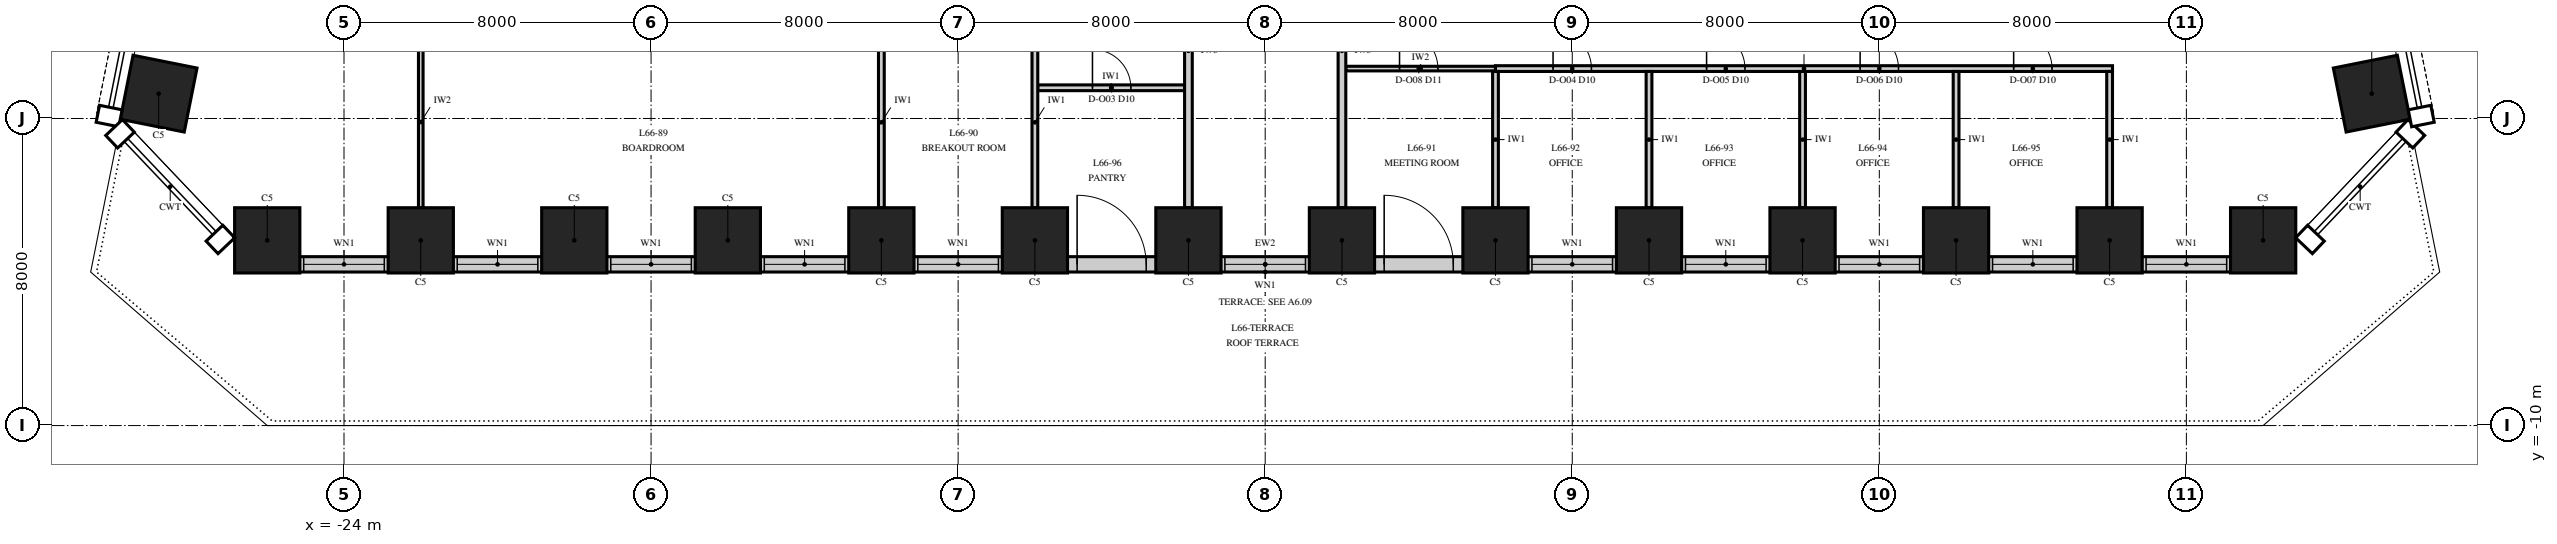
"""IFC4 building model, lengths in metres.
Left out: names, types, materials, properties, quantities, classifications, styles, units other than length and angle.
Written with IfcOpenShell. Run it as: python <this file> out.ifc"""

import sys

from ifc_helpers import new_model, si_unit, direction, frame, frame_2d, origin, origin_2d, place, context, subcontext, project, spatial, rectangle, extrude, element, fill, save


model = new_model("IFC4")
c1 = context("Model", 3, precision=1e-05, world=origin(), true_north=direction((0.0, 1.0)))
c2 = subcontext(c1, "Body", "Model", "MODEL_VIEW")
j1 = project(units=[si_unit("LENGTHUNIT", "METRE"), si_unit("PLANEANGLEUNIT", "RADIAN")], contexts=[c1])
p1 = place(None, origin())
s1 = spatial("IfcSite", under=j1, at=p1, CompositionType="ELEMENT")
p2 = place(p1, origin())
s2 = spatial("IfcBuilding", under=s1, at=p2, CompositionType="ELEMENT")
p3 = place(p2, frame((0.0, 0.0, 284.0)))
s3 = spatial("IfcBuildingStorey", under=s2, at=p3, CompositionType="ELEMENT", Elevation=284.0)
for number, where, z_axis, x_axis in (
    (1, (-26.0, -5.175, 0.0), (0.0, 0.0, 1.0), (1.0, 0.0, 0.0)),
    (2, (-22.0, -5.175, 0.0), (0.0, 0.0, 1.0), (1.0, 0.0, 0.0)),
    (3, (-18.0, -5.175, 0.0), (0.0, 0.0, 1.0), (1.0, 0.0, 0.0)),
    (4, (-14.0, -5.175, 0.0), (0.0, 0.0, 1.0), (1.0, 0.0, 0.0)),
    (5, (-10.0, -5.175, 0.0), (0.0, 0.0, 1.0), (1.0, 0.0, 0.0)),
    (6, (-6.0, -5.175, 0.0), (0.0, 0.0, 1.0), (1.0, 0.0, 0.0)),
    (7, (-2.0, -5.175, 0.0), (0.0, 0.0, 1.0), (1.0, 0.0, 0.0)),
    (8, (2.0, -5.175, 0.0), (0.0, 0.0, 1.0), (1.0, 0.0, 0.0)),
    (9, (6.0, -5.175, 0.0), (0.0, 0.0, 1.0), (1.0, 0.0, 0.0)),
    (10, (10.0, -5.175, 0.0), (0.0, 0.0, 1.0), (1.0, 0.0, 0.0)),
    (11, (14.0, -5.175, 0.0), (0.0, 0.0, 1.0), (1.0, 0.0, 0.0)),
    (12, (18.0, -5.175, 0.0), (0.0, 0.0, 1.0), (1.0, 0.0, 0.0)),
    (13, (22.0, -5.175, 0.0), (0.0, 0.0, 1.0), (1.0, 0.0, 0.0)),
    (14, (26.0, -5.175, 0.0), (0.0, 0.0, 1.0), (1.0, 0.0, 0.0)),
    (15, (28.829, -1.353, 0.0), (0.0, 0.0, 1.0), (-0.196, 0.981, 0.0)),
    (16, (-28.829, -1.353, 0.0), (0.0, 0.0, 1.0), (-0.196, -0.981, 0.0)),
):
    element("IfcColumn", number, at=place(p3, frame(where, z_axis=z_axis, x_axis=x_axis)), inside=s3, PredefinedType="COLUMN", context=c2, shape_type="SweptSolid", body=[
        extrude(rectangle(XDim=1.7, YDim=1.7, at=origin_2d()), origin(), (0.0, 0.0, 1.0), 4.0),
    ])
p4 = place(p3, frame((-26.0, -5.8, 0.0), z_axis=(0.0, 0.0, 1.0), x_axis=(1.0, 0.0, 0.0)))
e17 = element("IfcWall", 17, at=p4, inside=s3, PredefinedType="SOLIDWALL", context=c2, shape_type="SweptSolid", body=[
    extrude(rectangle(XDim=52.0, YDim=0.4, at=frame_2d((26.0, 0.0))), origin(), (0.0, 0.0, 1.0), 2.0),
])
p5 = place(p4, frame((0.95, 0.0, 0.8)))
e18 = element("IfcOpeningElement", 18, at=p5, cuts=e17, PredefinedType="OPENING", context=c2, shape_type="SweptSolid", body=[
    extrude(rectangle(XDim=2.1, YDim=1.15, at=frame_2d((1.05, 0.575))), frame((0.0, 0.215, 0.0), z_axis=(0.0, -1.0, 0.0), x_axis=(1.0, 0.0, 0.0)), (0.0, 0.0, 1.0), 0.43),
])
p6 = place(p4, frame((4.95, 0.0, 0.8)))
e19 = element("IfcOpeningElement", 19, at=p6, cuts=e17, PredefinedType="OPENING", context=c2, shape_type="SweptSolid", body=[
    extrude(rectangle(XDim=2.1, YDim=1.15, at=frame_2d((1.05, 0.575))), frame((0.0, 0.215, 0.0), z_axis=(0.0, -1.0, 0.0), x_axis=(1.0, 0.0, 0.0)), (0.0, 0.0, 1.0), 0.43),
])
p7 = place(p4, frame((8.95, 0.0, 0.8)))
e20 = element("IfcOpeningElement", 20, at=p7, cuts=e17, PredefinedType="OPENING", context=c2, shape_type="SweptSolid", body=[
    extrude(rectangle(XDim=2.1, YDim=1.15, at=frame_2d((1.05, 0.575))), frame((0.0, 0.215, 0.0), z_axis=(0.0, -1.0, 0.0), x_axis=(1.0, 0.0, 0.0)), (0.0, 0.0, 1.0), 0.43),
])
p8 = place(p4, frame((12.95, 0.0, 0.8)))
e21 = element("IfcOpeningElement", 21, at=p8, cuts=e17, PredefinedType="OPENING", context=c2, shape_type="SweptSolid", body=[
    extrude(rectangle(XDim=2.1, YDim=1.15, at=frame_2d((1.05, 0.575))), frame((0.0, 0.215, 0.0), z_axis=(0.0, -1.0, 0.0), x_axis=(1.0, 0.0, 0.0)), (0.0, 0.0, 1.0), 0.43),
])
p9 = place(p4, frame((16.95, 0.0, 0.8)))
e22 = element("IfcOpeningElement", 22, at=p9, cuts=e17, PredefinedType="OPENING", context=c2, shape_type="SweptSolid", body=[
    extrude(rectangle(XDim=2.1, YDim=1.15, at=frame_2d((1.05, 0.575))), frame((0.0, 0.215, 0.0), z_axis=(0.0, -1.0, 0.0), x_axis=(1.0, 0.0, 0.0)), (0.0, 0.0, 1.0), 0.43),
])
p10 = place(p4, frame((21.1, 0.0, 0.0)))
e23 = element("IfcOpeningElement", 23, at=p10, cuts=e17, PredefinedType="OPENING", context=c2, shape_type="SweptSolid", body=[
    extrude(rectangle(XDim=1.8, YDim=2.0, at=frame_2d((0.9, 1.0))), frame((0.0, 0.215, 0.0), z_axis=(0.0, -1.0, 0.0), x_axis=(1.0, 0.0, 0.0)), (0.0, 0.0, 1.0), 0.43),
])
p11 = place(p4, frame((24.95, 0.0, 0.8)))
e24 = element("IfcOpeningElement", 24, at=p11, cuts=e17, PredefinedType="OPENING", context=c2, shape_type="SweptSolid", body=[
    extrude(rectangle(XDim=2.1, YDim=1.15, at=frame_2d((1.05, 0.575))), frame((0.0, 0.215, 0.0), z_axis=(0.0, -1.0, 0.0), x_axis=(1.0, 0.0, 0.0)), (0.0, 0.0, 1.0), 0.43),
])
p12 = place(p4, frame((29.1, 0.0, 0.0)))
e25 = element("IfcOpeningElement", 25, at=p12, cuts=e17, PredefinedType="OPENING", context=c2, shape_type="SweptSolid", body=[
    extrude(rectangle(XDim=1.8, YDim=2.0, at=frame_2d((0.9, 1.0))), frame((0.0, 0.215, 0.0), z_axis=(0.0, -1.0, 0.0), x_axis=(1.0, 0.0, 0.0)), (0.0, 0.0, 1.0), 0.43),
])
p13 = place(p4, frame((32.95, 0.0, 0.8)))
e26 = element("IfcOpeningElement", 26, at=p13, cuts=e17, PredefinedType="OPENING", context=c2, shape_type="SweptSolid", body=[
    extrude(rectangle(XDim=2.1, YDim=1.15, at=frame_2d((1.05, 0.575))), frame((0.0, 0.215, 0.0), z_axis=(0.0, -1.0, 0.0), x_axis=(1.0, 0.0, 0.0)), (0.0, 0.0, 1.0), 0.43),
])
p14 = place(p4, frame((36.95, 0.0, 0.8)))
e27 = element("IfcOpeningElement", 27, at=p14, cuts=e17, PredefinedType="OPENING", context=c2, shape_type="SweptSolid", body=[
    extrude(rectangle(XDim=2.1, YDim=1.15, at=frame_2d((1.05, 0.575))), frame((0.0, 0.215, 0.0), z_axis=(0.0, -1.0, 0.0), x_axis=(1.0, 0.0, 0.0)), (0.0, 0.0, 1.0), 0.43),
])
p15 = place(p4, frame((40.95, 0.0, 0.8)))
e28 = element("IfcOpeningElement", 28, at=p15, cuts=e17, PredefinedType="OPENING", context=c2, shape_type="SweptSolid", body=[
    extrude(rectangle(XDim=2.1, YDim=1.15, at=frame_2d((1.05, 0.575))), frame((0.0, 0.215, 0.0), z_axis=(0.0, -1.0, 0.0), x_axis=(1.0, 0.0, 0.0)), (0.0, 0.0, 1.0), 0.43),
])
p16 = place(p4, frame((44.95, 0.0, 0.8)))
e29 = element("IfcOpeningElement", 29, at=p16, cuts=e17, PredefinedType="OPENING", context=c2, shape_type="SweptSolid", body=[
    extrude(rectangle(XDim=2.1, YDim=1.15, at=frame_2d((1.05, 0.575))), frame((0.0, 0.215, 0.0), z_axis=(0.0, -1.0, 0.0), x_axis=(1.0, 0.0, 0.0)), (0.0, 0.0, 1.0), 0.43),
])
p17 = place(p4, frame((48.95, 0.0, 0.8)))
e30 = element("IfcOpeningElement", 30, at=p17, cuts=e17, PredefinedType="OPENING", context=c2, shape_type="SweptSolid", body=[
    extrude(rectangle(XDim=2.1, YDim=1.15, at=frame_2d((1.05, 0.575))), frame((0.0, 0.215, 0.0), z_axis=(0.0, -1.0, 0.0), x_axis=(1.0, 0.0, 0.0)), (0.0, 0.0, 1.0), 0.43),
])
p18 = place(p3, frame((-5.925, -1.2, 0.0), z_axis=(0.0, 0.0, 1.0), x_axis=(1.0, 0.0, 0.0)))
e31 = element("IfcWall", 31, at=p18, inside=s3, PredefinedType="PARTITIONING", context=c2, shape_type="SweptSolid", body=[
    extrude(rectangle(XDim=3.825, YDim=0.15, at=frame_2d((1.913, 0.0))), origin(), (0.0, 0.0, 1.0), 3.23),
])
p19 = place(p18, frame((1.425, 0.0, 0.0)))
e32 = element("IfcOpeningElement", 32, at=p19, cuts=e31, PredefinedType="OPENING", context=c2, shape_type="SweptSolid", body=[
    extrude(rectangle(XDim=1.0, YDim=2.3, at=frame_2d((0.5, 1.15))), frame((0.0, 0.09, 0.0), z_axis=(0.0, -1.0, 0.0), x_axis=(1.0, 0.0, 0.0)), (0.0, 0.0, 1.0), 0.18),
])
p20 = place(p3, frame((2.1, -0.7, 0.0), z_axis=(0.0, 0.0, 1.0), x_axis=(1.0, 0.0, 0.0)))
e33 = element("IfcWall", 33, at=p20, inside=s3, PredefinedType="PARTITIONING", context=c2, shape_type="SweptSolid", body=[
    extrude(rectangle(XDim=3.9, YDim=0.12, at=frame_2d((1.95, 0.0))), origin(), (0.0, 0.0, 1.0), 3.23),
])
p21 = place(p20, frame((1.4, 0.0, 0.0)))
e34 = element("IfcOpeningElement", 34, at=p21, cuts=e33, PredefinedType="OPENING", context=c2, shape_type="SweptSolid", body=[
    extrude(rectangle(XDim=1.0, YDim=2.4, at=frame_2d((0.5, 1.2))), frame((0.0, 0.075, 0.0), z_axis=(0.0, -1.0, 0.0), x_axis=(1.0, 0.0, 0.0)), (0.0, 0.0, 1.0), 0.15),
])
p22 = place(p3, frame((6.0, -0.7, 0.0), z_axis=(0.0, 0.0, 1.0), x_axis=(1.0, 0.0, 0.0)))
e35 = element("IfcWall", 35, at=p22, inside=s3, PredefinedType="PARTITIONING", context=c2, shape_type="SweptSolid", body=[
    extrude(rectangle(XDim=16.075, YDim=0.15, at=frame_2d((8.038, 0.0))), origin(), (0.0, 0.0, 1.0), 3.23),
])
p23 = place(p22, frame((1.5, 0.0, 0.0)))
e36 = element("IfcOpeningElement", 36, at=p23, cuts=e35, PredefinedType="OPENING", context=c2, shape_type="SweptSolid", body=[
    extrude(rectangle(XDim=1.0, YDim=2.3, at=frame_2d((0.5, 1.15))), frame((0.0, 0.09, 0.0), z_axis=(0.0, -1.0, 0.0), x_axis=(1.0, 0.0, 0.0)), (0.0, 0.0, 1.0), 0.18),
])
p24 = place(p22, frame((5.5, 0.0, 0.0)))
e37 = element("IfcOpeningElement", 37, at=p24, cuts=e35, PredefinedType="OPENING", context=c2, shape_type="SweptSolid", body=[
    extrude(rectangle(XDim=1.0, YDim=2.3, at=frame_2d((0.5, 1.15))), frame((0.0, 0.09, 0.0), z_axis=(0.0, -1.0, 0.0), x_axis=(1.0, 0.0, 0.0)), (0.0, 0.0, 1.0), 0.18),
])
p25 = place(p22, frame((9.5, 0.0, 0.0)))
e38 = element("IfcOpeningElement", 38, at=p25, cuts=e35, PredefinedType="OPENING", context=c2, shape_type="SweptSolid", body=[
    extrude(rectangle(XDim=1.0, YDim=2.3, at=frame_2d((0.5, 1.15))), frame((0.0, 0.09, 0.0), z_axis=(0.0, -1.0, 0.0), x_axis=(1.0, 0.0, 0.0)), (0.0, 0.0, 1.0), 0.18),
])
p26 = place(p22, frame((13.5, 0.0, 0.0)))
e39 = element("IfcOpeningElement", 39, at=p26, cuts=e35, PredefinedType="OPENING", context=c2, shape_type="SweptSolid", body=[
    extrude(rectangle(XDim=1.0, YDim=2.3, at=frame_2d((0.5, 1.15))), frame((0.0, 0.09, 0.0), z_axis=(0.0, -1.0, 0.0), x_axis=(1.0, 0.0, 0.0)), (0.0, 0.0, 1.0), 0.18),
])
p27 = place(p3, frame((-22.0, -4.325, 0.0), z_axis=(0.0, 0.0, 1.0), x_axis=(0.0, 1.0, 0.0)))
e40 = element("IfcWall", 40, at=p27, inside=s3, PredefinedType="PARTITIONING", context=c2, shape_type="SweptSolid", body=[
    extrude(rectangle(XDim=4.465, YDim=0.12, at=frame_2d((2.232, 0.0))), origin(), (0.0, 0.0, 1.0), 3.23),
])
for number, where, z_axis, x_axis in (
    (41, (-10.0, -4.325, 0.0), (0.0, 0.0, 1.0), (0.0, 1.0, 0.0)),
    (42, (-6.0, -4.325, 0.0), (0.0, 0.0, 1.0), (0.0, 1.0, 0.0)),
):
    element("IfcWall", number, at=place(p3, frame(where, z_axis=z_axis, x_axis=x_axis)), inside=s3, PredefinedType="PARTITIONING", context=c2, shape_type="SweptSolid", body=[
        extrude(rectangle(XDim=4.45, YDim=0.15, at=frame_2d((2.225, 0.0))), origin(), (0.0, 0.0, 1.0), 3.23),
    ])
for number, where, z_axis, x_axis in (
    (43, (-2.0, -4.325, 0.0), (0.0, 0.0, 1.0), (0.0, 1.0, 0.0)),
    (44, (2.0, -4.325, 0.0), (0.0, 0.0, 1.0), (0.0, 1.0, 0.0)),
):
    element("IfcWall", number, at=place(p3, frame(where, z_axis=z_axis, x_axis=x_axis)), inside=s3, PredefinedType="PARTITIONING", context=c2, shape_type="SweptSolid", body=[
        extrude(rectangle(XDim=8.175, YDim=0.2, at=frame_2d((4.087, 0.0))), origin(), (0.0, 0.0, 1.0), 3.23),
    ])
for number, where, z_axis, x_axis in (
    (45, (6.0, -4.325, 0.0), (0.0, 0.0, 1.0), (0.0, 1.0, 0.0)),
    (46, (10.0, -4.325, 0.0), (0.0, 0.0, 1.0), (0.0, 1.0, 0.0)),
    (47, (14.0, -4.325, 0.0), (0.0, 0.0, 1.0), (0.0, 1.0, 0.0)),
    (48, (18.0, -4.325, 0.0), (0.0, 0.0, 1.0), (0.0, 1.0, 0.0)),
    (49, (22.0, -4.325, 0.0), (0.0, 0.0, 1.0), (0.0, 1.0, 0.0)),
):
    element("IfcWall", number, at=place(p3, frame(where, z_axis=z_axis, x_axis=x_axis)), inside=s3, PredefinedType="PARTITIONING", context=c2, shape_type="SweptSolid", body=[
        extrude(rectangle(XDim=3.55, YDim=0.15, at=frame_2d((1.775, 0.0))), origin(), (0.0, 0.0, 1.0), 3.23),
    ])
p28 = place(p5, origin())
e50 = element("IfcWindow", 50, at=p28, inside=s3, PartitioningType="SINGLE_PANEL", PredefinedType="WINDOW", context=c2, shape_type="SweptSolid", body=[
    extrude(rectangle(XDim=2.1, YDim=1.15, at=frame_2d((1.05, 0.575))), frame((0.0, 0.03, 0.0), z_axis=(0.0, -1.0, 0.0), x_axis=(1.0, 0.0, 0.0)), (0.0, 0.0, 1.0), 0.06),
])
fill(e18, e50)
p29 = place(p6, origin())
e51 = element("IfcWindow", 51, at=p29, inside=s3, PartitioningType="SINGLE_PANEL", PredefinedType="WINDOW", context=c2, shape_type="SweptSolid", body=[
    extrude(rectangle(XDim=2.1, YDim=1.15, at=frame_2d((1.05, 0.575))), frame((0.0, 0.03, 0.0), z_axis=(0.0, -1.0, 0.0), x_axis=(1.0, 0.0, 0.0)), (0.0, 0.0, 1.0), 0.06),
])
fill(e19, e51)
p30 = place(p7, origin())
e52 = element("IfcWindow", 52, at=p30, inside=s3, PartitioningType="SINGLE_PANEL", PredefinedType="WINDOW", context=c2, shape_type="SweptSolid", body=[
    extrude(rectangle(XDim=2.1, YDim=1.15, at=frame_2d((1.05, 0.575))), frame((0.0, 0.03, 0.0), z_axis=(0.0, -1.0, 0.0), x_axis=(1.0, 0.0, 0.0)), (0.0, 0.0, 1.0), 0.06),
])
fill(e20, e52)
p31 = place(p8, origin())
e53 = element("IfcWindow", 53, at=p31, inside=s3, PartitioningType="SINGLE_PANEL", PredefinedType="WINDOW", context=c2, shape_type="SweptSolid", body=[
    extrude(rectangle(XDim=2.1, YDim=1.15, at=frame_2d((1.05, 0.575))), frame((0.0, 0.03, 0.0), z_axis=(0.0, -1.0, 0.0), x_axis=(1.0, 0.0, 0.0)), (0.0, 0.0, 1.0), 0.06),
])
fill(e21, e53)
p32 = place(p9, origin())
e54 = element("IfcWindow", 54, at=p32, inside=s3, PartitioningType="SINGLE_PANEL", PredefinedType="WINDOW", context=c2, shape_type="SweptSolid", body=[
    extrude(rectangle(XDim=2.1, YDim=1.15, at=frame_2d((1.05, 0.575))), frame((0.0, 0.03, 0.0), z_axis=(0.0, -1.0, 0.0), x_axis=(1.0, 0.0, 0.0)), (0.0, 0.0, 1.0), 0.06),
])
fill(e22, e54)
p33 = place(p10, origin())
e55 = element("IfcDoor", 55, at=p33, inside=s3, OperationType="DOUBLE_DOOR_SINGLE_SWING", PredefinedType="DOOR", context=c2, shape_type="SweptSolid", body=[
    extrude(rectangle(XDim=1.8, YDim=2.0, at=frame_2d((0.9, 1.0))), frame((0.0, 0.2, 0.0), z_axis=(0.0, -1.0, 0.0), x_axis=(1.0, 0.0, 0.0)), (0.0, 0.0, 1.0), 0.399),
])
fill(e23, e55)
p34 = place(p11, origin())
e56 = element("IfcWindow", 56, at=p34, inside=s3, PartitioningType="SINGLE_PANEL", PredefinedType="WINDOW", context=c2, shape_type="SweptSolid", body=[
    extrude(rectangle(XDim=2.1, YDim=1.15, at=frame_2d((1.05, 0.575))), frame((0.0, 0.03, 0.0), z_axis=(0.0, -1.0, 0.0), x_axis=(1.0, 0.0, 0.0)), (0.0, 0.0, 1.0), 0.06),
])
fill(e24, e56)
p35 = place(p12, origin())
e57 = element("IfcDoor", 57, at=p35, inside=s3, OperationType="DOUBLE_DOOR_SINGLE_SWING", PredefinedType="DOOR", context=c2, shape_type="SweptSolid", body=[
    extrude(rectangle(XDim=1.8, YDim=2.0, at=frame_2d((0.9, 1.0))), frame((0.0, 0.2, 0.0), z_axis=(0.0, -1.0, 0.0), x_axis=(1.0, 0.0, 0.0)), (0.0, 0.0, 1.0), 0.399),
])
fill(e25, e57)
p36 = place(p13, origin())
e58 = element("IfcWindow", 58, at=p36, inside=s3, PartitioningType="SINGLE_PANEL", PredefinedType="WINDOW", context=c2, shape_type="SweptSolid", body=[
    extrude(rectangle(XDim=2.1, YDim=1.15, at=frame_2d((1.05, 0.575))), frame((0.0, 0.03, 0.0), z_axis=(0.0, -1.0, 0.0), x_axis=(1.0, 0.0, 0.0)), (0.0, 0.0, 1.0), 0.06),
])
fill(e26, e58)
p37 = place(p14, origin())
e59 = element("IfcWindow", 59, at=p37, inside=s3, PartitioningType="SINGLE_PANEL", PredefinedType="WINDOW", context=c2, shape_type="SweptSolid", body=[
    extrude(rectangle(XDim=2.1, YDim=1.15, at=frame_2d((1.05, 0.575))), frame((0.0, 0.03, 0.0), z_axis=(0.0, -1.0, 0.0), x_axis=(1.0, 0.0, 0.0)), (0.0, 0.0, 1.0), 0.06),
])
fill(e27, e59)
p38 = place(p15, origin())
e60 = element("IfcWindow", 60, at=p38, inside=s3, PartitioningType="SINGLE_PANEL", PredefinedType="WINDOW", context=c2, shape_type="SweptSolid", body=[
    extrude(rectangle(XDim=2.1, YDim=1.15, at=frame_2d((1.05, 0.575))), frame((0.0, 0.03, 0.0), z_axis=(0.0, -1.0, 0.0), x_axis=(1.0, 0.0, 0.0)), (0.0, 0.0, 1.0), 0.06),
])
fill(e28, e60)
p39 = place(p16, origin())
e61 = element("IfcWindow", 61, at=p39, inside=s3, PartitioningType="SINGLE_PANEL", PredefinedType="WINDOW", context=c2, shape_type="SweptSolid", body=[
    extrude(rectangle(XDim=2.1, YDim=1.15, at=frame_2d((1.05, 0.575))), frame((0.0, 0.03, 0.0), z_axis=(0.0, -1.0, 0.0), x_axis=(1.0, 0.0, 0.0)), (0.0, 0.0, 1.0), 0.06),
])
fill(e29, e61)
p40 = place(p17, origin())
e62 = element("IfcWindow", 62, at=p40, inside=s3, PartitioningType="SINGLE_PANEL", PredefinedType="WINDOW", context=c2, shape_type="SweptSolid", body=[
    extrude(rectangle(XDim=2.1, YDim=1.15, at=frame_2d((1.05, 0.575))), frame((0.0, 0.03, 0.0), z_axis=(0.0, -1.0, 0.0), x_axis=(1.0, 0.0, 0.0)), (0.0, 0.0, 1.0), 0.06),
])
fill(e30, e62)
p41 = place(p19, origin())
e63 = element("IfcDoor", 63, at=p41, inside=s3, OperationType="SINGLE_SWING_LEFT", PredefinedType="DOOR", context=c2, shape_type="SweptSolid", body=[
    extrude(rectangle(XDim=1.0, YDim=2.3, at=frame_2d((0.5, 1.15))), frame((0.0, 0.075, 0.0), z_axis=(0.0, -1.0, 0.0), x_axis=(1.0, 0.0, 0.0)), (0.0, 0.0, 1.0), 0.149),
])
fill(e32, e63)
p42 = place(p23, origin())
e64 = element("IfcDoor", 64, at=p42, inside=s3, OperationType="SINGLE_SWING_LEFT", PredefinedType="DOOR", context=c2, shape_type="SweptSolid", body=[
    extrude(rectangle(XDim=1.0, YDim=2.3, at=frame_2d((0.5, 1.15))), frame((0.0, 0.075, 0.0), z_axis=(0.0, -1.0, 0.0), x_axis=(1.0, 0.0, 0.0)), (0.0, 0.0, 1.0), 0.149),
])
fill(e36, e64)
p43 = place(p24, origin())
e65 = element("IfcDoor", 65, at=p43, inside=s3, OperationType="SINGLE_SWING_LEFT", PredefinedType="DOOR", context=c2, shape_type="SweptSolid", body=[
    extrude(rectangle(XDim=1.0, YDim=2.3, at=frame_2d((0.5, 1.15))), frame((0.0, 0.075, 0.0), z_axis=(0.0, -1.0, 0.0), x_axis=(1.0, 0.0, 0.0)), (0.0, 0.0, 1.0), 0.149),
])
fill(e37, e65)
p44 = place(p25, origin())
e66 = element("IfcDoor", 66, at=p44, inside=s3, OperationType="SINGLE_SWING_LEFT", PredefinedType="DOOR", context=c2, shape_type="SweptSolid", body=[
    extrude(rectangle(XDim=1.0, YDim=2.3, at=frame_2d((0.5, 1.15))), frame((0.0, 0.075, 0.0), z_axis=(0.0, -1.0, 0.0), x_axis=(1.0, 0.0, 0.0)), (0.0, 0.0, 1.0), 0.149),
])
fill(e38, e66)
p45 = place(p26, origin())
e67 = element("IfcDoor", 67, at=p45, inside=s3, OperationType="SINGLE_SWING_LEFT", PredefinedType="DOOR", context=c2, shape_type="SweptSolid", body=[
    extrude(rectangle(XDim=1.0, YDim=2.3, at=frame_2d((0.5, 1.15))), frame((0.0, 0.075, 0.0), z_axis=(0.0, -1.0, 0.0), x_axis=(1.0, 0.0, 0.0)), (0.0, 0.0, 1.0), 0.149),
])
fill(e39, e67)
p46 = place(p21, origin())
e68 = element("IfcDoor", 68, at=p46, inside=s3, OperationType="SINGLE_SWING_RIGHT", PredefinedType="DOOR", context=c2, shape_type="SweptSolid", body=[
    extrude(rectangle(XDim=1.0, YDim=2.4, at=frame_2d((0.5, 1.2))), frame((0.0, 0.06, 0.0), z_axis=(0.0, -1.0, 0.0), x_axis=(1.0, 0.0, 0.0)), (0.0, 0.0, 1.0), 0.12),
])
fill(e34, e68)
save(model, sys.argv[1])
